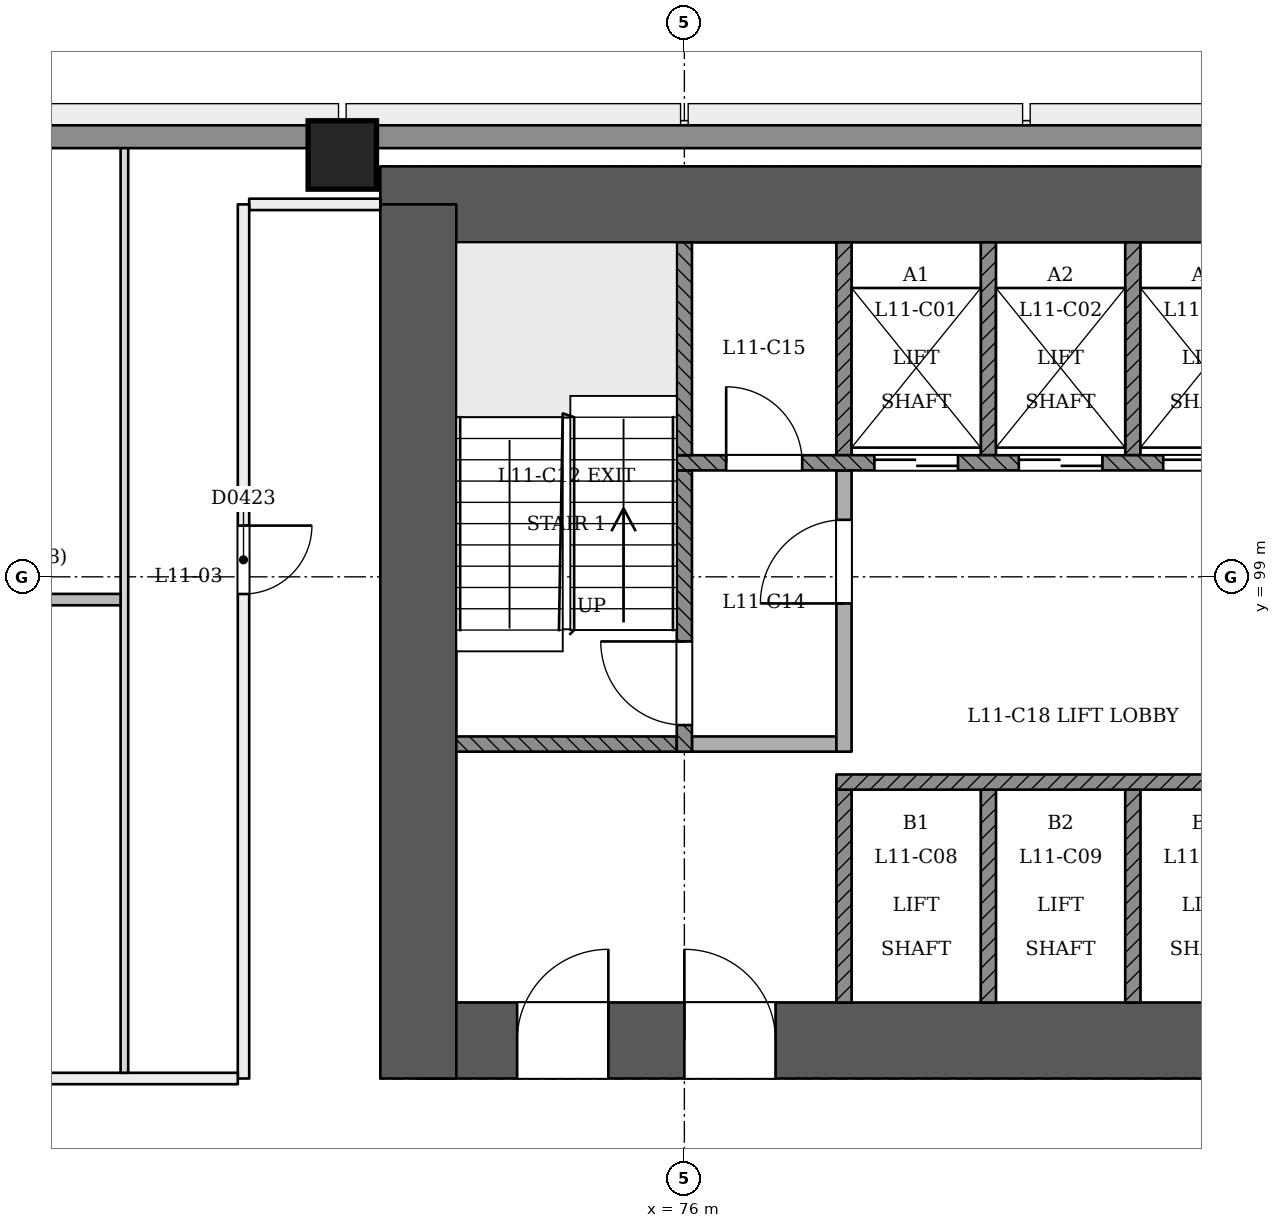
"""IFC4 building model, lengths in metres.
Left out: names, types, materials, properties, quantities, classifications, styles, units other than length and angle.
Written with IfcOpenShell. Run it as: python <this file> out.ifc"""

import sys

from ifc_helpers import new_model, si_unit, direction, frame, frame_2d, origin, origin_2d, place, context, subcontext, project, spatial, rectangle, extrude, element, fill, save


model = new_model("IFC4")
c1 = context("Model", 3, precision=1e-05, world=origin(), true_north=direction((0.0, 1.0)))
c2 = subcontext(c1, "Body", "Model", "MODEL_VIEW")
j1 = project(units=[si_unit("LENGTHUNIT", "METRE"), si_unit("PLANEANGLEUNIT", "RADIAN")], contexts=[c1])
p1 = place(None, origin())
s1 = spatial("IfcSite", under=j1, at=p1, CompositionType="ELEMENT")
p2 = place(p1, origin())
s2 = spatial("IfcBuilding", under=s1, at=p2, CompositionType="ELEMENT")
p3 = place(p2, frame((0.0, 0.0, 48.6)))
s3 = spatial("IfcBuildingStorey", under=s2, at=p3, CompositionType="ELEMENT", Elevation=48.6)
p4 = place(p3, frame((72.5, 92.9, 0.0), z_axis=(0.0, 0.0, 1.0), x_axis=(1.0, 0.0, 0.0)))
e1 = element("IfcWall", 1, at=p4, inside=s3, PredefinedType="SHEAR", context=c2, shape_type="SweptSolid", body=[
    extrude(rectangle(XDim=25.5, YDim=1.0, at=frame_2d((12.75, 0.0))), origin(), (0.0, 0.0, 1.0), 3.6),
])
p5 = place(p4, frame((1.3, 0.0, 0.0)))
e2 = element("IfcOpeningElement", 2, at=p5, cuts=e1, PredefinedType="OPENING", context=c2, shape_type="SweptSolid", body=[
    extrude(rectangle(XDim=1.2, YDim=2.1, at=frame_2d((0.6, 1.05))), frame((0.0, 0.51, 0.0), z_axis=(0.0, -1.0, 0.0), x_axis=(1.0, 0.0, 0.0)), (0.0, 0.0, 1.0), 1.021),
])
p6 = place(p4, frame((3.5, 0.0, 0.0)))
e3 = element("IfcOpeningElement", 3, at=p6, cuts=e1, PredefinedType="OPENING", context=c2, shape_type="SweptSolid", body=[
    extrude(rectangle(XDim=1.2, YDim=2.1, at=frame_2d((0.6, 1.05))), frame((0.0, 0.51, 0.0), z_axis=(0.0, -1.0, 0.0), x_axis=(1.0, 0.0, 0.0)), (0.0, 0.0, 1.0), 1.021),
])
p7 = place(p4, frame((13.5, 0.0, 0.0)))
e4 = element("IfcOpeningElement", 4, at=p7, cuts=e1, PredefinedType="OPENING", context=c2, shape_type="SweptSolid", body=[
    extrude(rectangle(XDim=1.2, YDim=2.1, at=frame_2d((0.6, 1.05))), frame((0.0, 0.51, 0.0), z_axis=(0.0, -1.0, 0.0), x_axis=(1.0, 0.0, 0.0)), (0.0, 0.0, 1.0), 1.021),
])
p8 = place(p4, frame((16.913, 0.0, 0.0)))
e5 = element("IfcOpeningElement", 5, at=p8, cuts=e1, PredefinedType="OPENING", context=c2, shape_type="SweptSolid", body=[
    extrude(rectangle(XDim=1.0, YDim=2.1, at=frame_2d((0.5, 1.05))), frame((0.0, 0.51, 0.0), z_axis=(0.0, -1.0, 0.0), x_axis=(1.0, 0.0, 0.0)), (0.0, 0.0, 1.0), 1.021),
])
p9 = place(p4, frame((20.8, 0.0, 0.0)))
e6 = element("IfcOpeningElement", 6, at=p9, cuts=e1, PredefinedType="OPENING", context=c2, shape_type="SweptSolid", body=[
    extrude(rectangle(XDim=1.0, YDim=2.1, at=frame_2d((0.5, 1.05))), frame((0.0, 0.51, 0.0), z_axis=(0.0, -1.0, 0.0), x_axis=(1.0, 0.0, 0.0)), (0.0, 0.0, 1.0), 1.021),
])
p10 = place(p4, frame((23.238, 0.0, 0.0)))
e7 = element("IfcOpeningElement", 7, at=p10, cuts=e1, PredefinedType="OPENING", context=c2, shape_type="SweptSolid", body=[
    extrude(rectangle(XDim=1.0, YDim=2.1, at=frame_2d((0.5, 1.05))), frame((0.0, 0.51, 0.0), z_axis=(0.0, -1.0, 0.0), x_axis=(1.0, 0.0, 0.0)), (0.0, 0.0, 1.0), 1.021),
])
p11 = place(p3, frame((97.5, 103.9, 0.0), z_axis=(0.0, 0.0, 1.0), x_axis=(-1.0, 0.0, 0.0)))
e8 = element("IfcWall", 8, at=p11, inside=s3, PredefinedType="SHEAR", context=c2, shape_type="SweptSolid", body=[
    extrude(rectangle(XDim=25.5, YDim=1.0, at=frame_2d((12.75, 0.0))), origin(), (0.0, 0.0, 1.0), 3.6),
])
p12 = place(p3, frame((72.5, 103.9, 0.0), z_axis=(0.0, 0.0, 1.0), x_axis=(0.0, -1.0, 0.0)))
e9 = element("IfcWall", 9, at=p12, inside=s3, PredefinedType="SHEAR", context=c2, shape_type="SweptSolid", body=[
    extrude(rectangle(XDim=11.5, YDim=1.0, at=frame_2d((5.75, 0.0))), origin(), (0.0, 0.0, 1.0), 3.6),
])
p13 = place(p3, frame((71.5, 104.55, 0.0), z_axis=(0.0, 0.0, 1.0), x_axis=(1.0, 0.0, 0.0)))
e10 = element("IfcColumn", 10, at=p13, inside=s3, PredefinedType="COLUMN", context=c2, shape_type="SweptSolid", body=[
    extrude(rectangle(XDim=0.9, YDim=0.9, at=origin_2d()), origin(), (0.0, 0.0, 1.0), 3.6),
])
p14 = place(p3, frame((72.0, 103.9, 0.0), z_axis=(0.0, 0.0, 1.0), x_axis=(-1.0, 0.0, 0.0)))
e11 = element("IfcWall", 11, at=p14, inside=s3, PredefinedType="PARTITIONING", context=c2, shape_type="SweptSolid", body=[
    extrude(rectangle(XDim=1.725, YDim=0.15, at=frame_2d((0.863, 0.0))), origin(), (0.0, 0.0, 1.0), 2.6),
])
p15 = place(p3, frame((70.2, 103.9, 0.0), z_axis=(0.0, 0.0, 1.0), x_axis=(0.0, -1.0, 0.0)))
e12 = element("IfcWall", 12, at=p15, inside=s3, PredefinedType="PARTITIONING", context=c2, shape_type="SweptSolid", body=[
    extrude(rectangle(XDim=11.5, YDim=0.15, at=frame_2d((5.75, 0.0))), origin(), (0.0, 0.0, 1.0), 2.6),
])
p16 = place(p15, frame((4.226, 0.0, 0.0)))
e13 = element("IfcOpeningElement", 13, at=p16, cuts=e12, PredefinedType="OPENING", context=c2, shape_type="SweptSolid", body=[
    extrude(rectangle(XDim=0.9, YDim=2.1, at=frame_2d((0.45, 1.05))), frame((0.0, 0.085, 0.0), z_axis=(0.0, -1.0, 0.0), x_axis=(1.0, 0.0, 0.0)), (0.0, 0.0, 1.0), 0.171),
])
p17 = place(p3, frame((70.125, 92.4, 0.0), z_axis=(0.0, 0.0, 1.0), x_axis=(-1.0, 0.0, 0.0)))
e14 = element("IfcWall", 14, at=p17, inside=s3, PredefinedType="PARTITIONING", context=c2, shape_type="SweptSolid", body=[
    extrude(rectangle(XDim=3.679, YDim=0.15, at=frame_2d((1.84, 0.0))), origin(), (0.0, 0.0, 1.0), 3.1),
])
p18 = place(p3, frame((63.923, 93.17, 0.0), z_axis=(0.0, 0.0, 1.0), x_axis=(0.500002225217, -0.866024119051, 0.0)))
e15 = element("IfcWall", 15, at=p18, inside=s3, PredefinedType="PARTITIONING", context=c2, shape_type="SweptSolid", body=[
    extrude(rectangle(XDim=38.6, YDim=0.15, at=frame_2d((19.3, 0.0))), origin(), (0.0, 0.0, 1.0), 2.7),
])
p19 = place(p18, frame((0.605, 0.0, 0.0)))
e16 = element("IfcOpeningElement", 16, at=p19, cuts=e15, PredefinedType="OPENING", context=c2, shape_type="SweptSolid", body=[
    extrude(rectangle(XDim=1.0, YDim=2.1, at=frame_2d((0.5, 1.05))), frame((0.0, 0.085, 0.0), z_axis=(0.0, -1.0, 0.0), x_axis=(1.0, 0.0, 0.0)), (0.0, 0.0, 1.0), 0.171),
])
p20 = place(p18, frame((7.28, 0.0, 0.0)))
e17 = element("IfcOpeningElement", 17, at=p20, cuts=e15, PredefinedType="OPENING", context=c2, shape_type="SweptSolid", body=[
    extrude(rectangle(XDim=1.0, YDim=2.1, at=frame_2d((0.5, 1.05))), frame((0.0, 0.085, 0.0), z_axis=(0.0, -1.0, 0.0), x_axis=(1.0, 0.0, 0.0)), (0.0, 0.0, 1.0), 0.171),
])
p21 = place(p18, frame((9.72, 0.0, 0.0)))
e18 = element("IfcOpeningElement", 18, at=p21, cuts=e15, PredefinedType="OPENING", context=c2, shape_type="SweptSolid", body=[
    extrude(rectangle(XDim=1.0, YDim=2.1, at=frame_2d((0.5, 1.05))), frame((0.0, 0.085, 0.0), z_axis=(0.0, -1.0, 0.0), x_axis=(1.0, 0.0, 0.0)), (0.0, 0.0, 1.0), 0.171),
])
p22 = place(p18, frame((16.395, 0.0, 0.0)))
e19 = element("IfcOpeningElement", 19, at=p22, cuts=e15, PredefinedType="OPENING", context=c2, shape_type="SweptSolid", body=[
    extrude(rectangle(XDim=1.0, YDim=2.1, at=frame_2d((0.5, 1.05))), frame((0.0, 0.085, 0.0), z_axis=(0.0, -1.0, 0.0), x_axis=(1.0, 0.0, 0.0)), (0.0, 0.0, 1.0), 0.171),
])
p23 = place(p18, frame((18.72, 0.0, 0.0)))
e20 = element("IfcOpeningElement", 20, at=p23, cuts=e15, PredefinedType="OPENING", context=c2, shape_type="SweptSolid", body=[
    extrude(rectangle(XDim=1.0, YDim=2.1, at=frame_2d((0.5, 1.05))), frame((0.0, 0.085, 0.0), z_axis=(0.0, -1.0, 0.0), x_axis=(1.0, 0.0, 0.0)), (0.0, 0.0, 1.0), 0.171),
])
p24 = place(p18, frame((25.395, 0.0, 0.0)))
e21 = element("IfcOpeningElement", 21, at=p24, cuts=e15, PredefinedType="OPENING", context=c2, shape_type="SweptSolid", body=[
    extrude(rectangle(XDim=1.0, YDim=2.1, at=frame_2d((0.5, 1.05))), frame((0.0, 0.085, 0.0), z_axis=(0.0, -1.0, 0.0), x_axis=(1.0, 0.0, 0.0)), (0.0, 0.0, 1.0), 0.171),
])
p25 = place(p18, frame((27.605, 0.0, 0.0)))
e22 = element("IfcOpeningElement", 22, at=p25, cuts=e15, PredefinedType="OPENING", context=c2, shape_type="SweptSolid", body=[
    extrude(rectangle(XDim=1.0, YDim=2.1, at=frame_2d((0.5, 1.05))), frame((0.0, 0.085, 0.0), z_axis=(0.0, -1.0, 0.0), x_axis=(1.0, 0.0, 0.0)), (0.0, 0.0, 1.0), 0.171),
])
p26 = place(p18, frame((34.28, 0.0, 0.0)))
e23 = element("IfcOpeningElement", 23, at=p26, cuts=e15, PredefinedType="OPENING", context=c2, shape_type="SweptSolid", body=[
    extrude(rectangle(XDim=1.0, YDim=2.1, at=frame_2d((0.5, 1.05))), frame((0.0, 0.085, 0.0), z_axis=(0.0, -1.0, 0.0), x_axis=(1.0, 0.0, 0.0)), (0.0, 0.0, 1.0), 0.171),
])
p27 = place(p18, frame((37.342, 0.0, 0.0)))
e24 = element("IfcOpeningElement", 24, at=p27, cuts=e15, PredefinedType="OPENING", context=c2, shape_type="SweptSolid", body=[
    extrude(rectangle(XDim=1.0, YDim=2.1, at=frame_2d((0.5, 1.05))), frame((0.0, 0.085, 0.0), z_axis=(0.0, -1.0, 0.0), x_axis=(1.0, 0.0, 0.0)), (0.0, 0.0, 1.0), 0.171),
])
p28 = place(p3, frame((68.633, 104.9, 0.0), z_axis=(0.0, 0.0, 1.0), x_axis=(0.0, -1.0, 0.0)))
e25 = element("IfcWall", 25, at=p28, inside=s3, PredefinedType="PARTITIONING", context=c2, shape_type="SweptSolid", body=[
    extrude(rectangle(XDim=12.425, YDim=0.1, at=frame_2d((6.212, 0.0))), origin(), (0.0, 0.0, 1.0), 2.6),
])
p29 = place(p3, frame((68.583, 98.7, 0.0), z_axis=(0.0, 0.0, 1.0), x_axis=(-1.0, 0.0, 0.0)))
e26 = element("IfcWall", 26, at=p29, inside=s3, PredefinedType="PARTITIONING", context=c2, shape_type="SweptSolid", body=[
    extrude(rectangle(XDim=3.741, YDim=0.15, at=frame_2d((1.871, 0.0))), origin(), (0.0, 0.0, 1.0), 3.1),
])
p30 = place(p3, frame((59.125, 104.79, 0.0), z_axis=(0.0, 0.0, 1.0), x_axis=(1.0, 0.0, 0.0)))
e27 = element("IfcWall", 27, at=p30, inside=s3, PredefinedType="SOLIDWALL", context=c2, shape_type="SweptSolid", body=[
    extrude(rectangle(XDim=51.75, YDim=0.3, at=frame_2d((25.875, 0.0))), origin(), (0.0, 0.0, 1.0), 2.6),
])
for number, where, z_axis, x_axis in (
    (28, (78.1, 93.4, 0.0), (0.0, 0.0, 1.0), (0.0, 1.0, 0.0)),
    (29, (80.0, 93.4, 0.0), (0.0, 0.0, 1.0), (0.0, 1.0, 0.0)),
    (30, (81.9, 93.4, 0.0), (0.0, 0.0, 1.0), (0.0, 1.0, 0.0)),
):
    element("IfcWall", number, at=place(p3, frame(where, z_axis=z_axis, x_axis=x_axis)), inside=s3, PredefinedType="SOLIDWALL", context=c2, shape_type="SweptSolid", body=[
        extrude(rectangle(XDim=2.8, YDim=0.2, at=frame_2d((1.4, 0.0))), origin(), (0.0, 0.0, 1.0), 3.1),
    ])
p31 = place(p3, frame((78.0, 96.3, 0.0), z_axis=(0.0, 0.0, 1.0), x_axis=(1.0, 0.0, 0.0)))
e31 = element("IfcWall", 31, at=p31, inside=s3, PredefinedType="SOLIDWALL", context=c2, shape_type="SweptSolid", body=[
    extrude(rectangle(XDim=7.8, YDim=0.2, at=frame_2d((3.9, 0.0))), origin(), (0.0, 0.0, 1.0), 3.1),
])
p32 = place(p3, frame((73.0, 96.8, 0.0), z_axis=(0.0, 0.0, 1.0), x_axis=(1.0, 0.0, 0.0)))
e32 = element("IfcWall", 32, at=p32, inside=s3, PredefinedType="SOLIDWALL", context=c2, shape_type="SweptSolid", body=[
    extrude(rectangle(XDim=2.9, YDim=0.2, at=frame_2d((1.45, 0.0))), origin(), (0.0, 0.0, 1.0), 3.1),
])
p33 = place(p3, frame((76.0, 96.7, 0.0), z_axis=(0.0, 0.0, 1.0), x_axis=(0.0, 1.0, 0.0)))
e33 = element("IfcWall", 33, at=p33, inside=s3, PredefinedType="SOLIDWALL", context=c2, shape_type="SweptSolid", body=[
    extrude(rectangle(XDim=3.7, YDim=0.2, at=frame_2d((1.85, 0.0))), origin(), (0.0, 0.0, 1.0), 3.1),
])
p34 = place(p33, frame((0.35, 0.0, 0.0)))
e34 = element("IfcOpeningElement", 34, at=p34, cuts=e33, PredefinedType="OPENING", context=c2, shape_type="SweptSolid", body=[
    extrude(rectangle(XDim=1.1, YDim=2.1, at=frame_2d((0.55, 1.05))), frame((0.0, 0.11, 0.0), z_axis=(0.0, -1.0, 0.0), x_axis=(1.0, 0.0, 0.0)), (0.0, 0.0, 1.0), 0.221),
])
p35 = place(p3, frame((76.1, 96.8, 0.0), z_axis=(0.0, 0.0, 1.0), x_axis=(1.0, 0.0, 0.0)))
e35 = element("IfcWall", 35, at=p35, inside=s3, PredefinedType="PARTITIONING", context=c2, shape_type="SweptSolid", body=[
    extrude(rectangle(XDim=1.9, YDim=0.2, at=frame_2d((0.95, 0.0))), origin(), (0.0, 0.0, 1.0), 3.1),
])
p36 = place(p3, frame((78.1, 96.7, 0.0), z_axis=(0.0, 0.0, 1.0), x_axis=(0.0, 1.0, 0.0)))
e36 = element("IfcWall", 36, at=p36, inside=s3, PredefinedType="PARTITIONING", context=c2, shape_type="SweptSolid", body=[
    extrude(rectangle(XDim=3.7, YDim=0.2, at=frame_2d((1.85, 0.0))), origin(), (0.0, 0.0, 1.0), 3.1),
])
p37 = place(p36, frame((1.95, 0.0, 0.0)))
e37 = element("IfcOpeningElement", 37, at=p37, cuts=e36, PredefinedType="OPENING", context=c2, shape_type="SweptSolid", body=[
    extrude(rectangle(XDim=1.1, YDim=2.1, at=frame_2d((0.55, 1.05))), frame((0.0, 0.11, 0.0), z_axis=(0.0, -1.0, 0.0), x_axis=(1.0, 0.0, 0.0)), (0.0, 0.0, 1.0), 0.221),
])
p38 = place(p3, frame((75.9, 100.5, 0.0), z_axis=(0.0, 0.0, 1.0), x_axis=(1.0, 0.0, 0.0)))
e38 = element("IfcWall", 38, at=p38, inside=s3, PredefinedType="SOLIDWALL", context=c2, shape_type="SweptSolid", body=[
    extrude(rectangle(XDim=18.2, YDim=0.2, at=frame_2d((9.1, 0.0))), origin(), (0.0, 0.0, 1.0), 3.1),
])
p39 = place(p38, frame((2.6, 0.0, 0.0)))
e39 = element("IfcOpeningElement", 39, at=p39, cuts=e38, PredefinedType="OPENING", context=c2, shape_type="SweptSolid", body=[
    extrude(rectangle(XDim=1.1, YDim=2.1, at=frame_2d((0.55, 1.05))), frame((0.0, 0.11, 0.0), z_axis=(0.0, -1.0, 0.0), x_axis=(1.0, 0.0, 0.0)), (0.0, 0.0, 1.0), 0.221),
])
p40 = place(p38, frame((4.5, 0.0, 0.0)))
e40 = element("IfcOpeningElement", 40, at=p40, cuts=e38, PredefinedType="OPENING", context=c2, shape_type="SweptSolid", body=[
    extrude(rectangle(XDim=1.1, YDim=2.1, at=frame_2d((0.55, 1.05))), frame((0.0, 0.11, 0.0), z_axis=(0.0, -1.0, 0.0), x_axis=(1.0, 0.0, 0.0)), (0.0, 0.0, 1.0), 0.221),
])
p41 = place(p38, frame((6.4, 0.0, 0.0)))
e41 = element("IfcOpeningElement", 41, at=p41, cuts=e38, PredefinedType="OPENING", context=c2, shape_type="SweptSolid", body=[
    extrude(rectangle(XDim=1.1, YDim=2.1, at=frame_2d((0.55, 1.05))), frame((0.0, 0.11, 0.0), z_axis=(0.0, -1.0, 0.0), x_axis=(1.0, 0.0, 0.0)), (0.0, 0.0, 1.0), 0.221),
])
p42 = place(p38, frame((8.3, 0.0, 0.0)))
e42 = element("IfcOpeningElement", 42, at=p42, cuts=e38, PredefinedType="OPENING", context=c2, shape_type="SweptSolid", body=[
    extrude(rectangle(XDim=1.1, YDim=2.1, at=frame_2d((0.55, 1.05))), frame((0.0, 0.11, 0.0), z_axis=(0.0, -1.0, 0.0), x_axis=(1.0, 0.0, 0.0)), (0.0, 0.0, 1.0), 0.221),
])
p43 = place(p38, frame((10.2, 0.0, 0.0)))
e43 = element("IfcOpeningElement", 43, at=p43, cuts=e38, PredefinedType="OPENING", context=c2, shape_type="SweptSolid", body=[
    extrude(rectangle(XDim=1.1, YDim=2.1, at=frame_2d((0.55, 1.05))), frame((0.0, 0.11, 0.0), z_axis=(0.0, -1.0, 0.0), x_axis=(1.0, 0.0, 0.0)), (0.0, 0.0, 1.0), 0.221),
])
p44 = place(p38, frame((12.1, 0.0, 0.0)))
e44 = element("IfcOpeningElement", 44, at=p44, cuts=e38, PredefinedType="OPENING", context=c2, shape_type="SweptSolid", body=[
    extrude(rectangle(XDim=1.1, YDim=2.1, at=frame_2d((0.55, 1.05))), frame((0.0, 0.11, 0.0), z_axis=(0.0, -1.0, 0.0), x_axis=(1.0, 0.0, 0.0)), (0.0, 0.0, 1.0), 0.221),
])
p45 = place(p38, frame((14.0, 0.0, 0.0)))
e45 = element("IfcOpeningElement", 45, at=p45, cuts=e38, PredefinedType="OPENING", context=c2, shape_type="SweptSolid", body=[
    extrude(rectangle(XDim=1.1, YDim=2.1, at=frame_2d((0.55, 1.05))), frame((0.0, 0.11, 0.0), z_axis=(0.0, -1.0, 0.0), x_axis=(1.0, 0.0, 0.0)), (0.0, 0.0, 1.0), 0.221),
])
p46 = place(p38, frame((0.65, 0.0, 0.0)))
e46 = element("IfcOpeningElement", 46, at=p46, cuts=e38, PredefinedType="OPENING", context=c2, shape_type="SweptSolid", body=[
    extrude(rectangle(XDim=1.0, YDim=2.1, at=frame_2d((0.5, 1.05))), frame((0.0, 0.11, 0.0), z_axis=(0.0, -1.0, 0.0), x_axis=(1.0, 0.0, 0.0)), (0.0, 0.0, 1.0), 0.221),
])
p47 = place(p38, frame((16.3, 0.0, 0.0)))
e47 = element("IfcOpeningElement", 47, at=p47, cuts=e38, PredefinedType="OPENING", context=c2, shape_type="SweptSolid", body=[
    extrude(rectangle(XDim=1.0, YDim=2.1, at=frame_2d((0.5, 1.05))), frame((0.0, 0.11, 0.0), z_axis=(0.0, -1.0, 0.0), x_axis=(1.0, 0.0, 0.0)), (0.0, 0.0, 1.0), 0.221),
])
for number, where, z_axis, x_axis in (
    (48, (76.0, 100.6, 0.0), (0.0, 0.0, 1.0), (0.0, 1.0, 0.0)),
    (49, (78.1, 100.6, 0.0), (0.0, 0.0, 1.0), (0.0, 1.0, 0.0)),
    (50, (80.0, 100.6, 0.0), (0.0, 0.0, 1.0), (0.0, 1.0, 0.0)),
    (51, (81.9, 100.6, 0.0), (0.0, 0.0, 1.0), (0.0, 1.0, 0.0)),
):
    element("IfcWall", number, at=place(p3, frame(where, z_axis=z_axis, x_axis=x_axis)), inside=s3, PredefinedType="SOLIDWALL", context=c2, shape_type="SweptSolid", body=[
        extrude(rectangle(XDim=2.8, YDim=0.2, at=frame_2d((1.4, 0.0))), origin(), (0.0, 0.0, 1.0), 3.1),
    ])
p48 = place(p16, origin())
e52 = element("IfcDoor", 52, at=p48, inside=s3, OperationType="SINGLE_SWING_LEFT", PredefinedType="NOTDEFINED", context=c2, shape_type="SweptSolid", body=[
    extrude(rectangle(XDim=0.9, YDim=2.1, at=frame_2d((0.45, 1.05))), frame((0.0, 0.025, 0.0), z_axis=(0.0, -1.0, 0.0), x_axis=(1.0, 0.0, 0.0)), (0.0, 0.0, 1.0), 0.05),
])
fill(e13, e52)
p49 = place(p39, origin())
e53 = element("IfcDoor", 53, at=p49, inside=s3, OperationType="SLIDING_TO_RIGHT", PredefinedType="NOTDEFINED", context=c2, shape_type="SweptSolid", body=[
    extrude(rectangle(XDim=1.1, YDim=2.1, at=frame_2d((0.55, 1.05))), frame((0.0, 0.025, 0.0), z_axis=(0.0, -1.0, 0.0), x_axis=(1.0, 0.0, 0.0)), (0.0, 0.0, 1.0), 0.05),
])
fill(e39, e53)
p50 = place(p40, origin())
e54 = element("IfcDoor", 54, at=p50, inside=s3, OperationType="SLIDING_TO_LEFT", PredefinedType="NOTDEFINED", context=c2, shape_type="SweptSolid", body=[
    extrude(rectangle(XDim=1.1, YDim=2.1, at=frame_2d((0.55, 1.05))), frame((0.0, 0.025, 0.0), z_axis=(0.0, -1.0, 0.0), x_axis=(1.0, 0.0, 0.0)), (0.0, 0.0, 1.0), 0.05),
])
fill(e40, e54)
p51 = place(p41, origin())
e55 = element("IfcDoor", 55, at=p51, inside=s3, OperationType="SLIDING_TO_RIGHT", PredefinedType="NOTDEFINED", context=c2, shape_type="SweptSolid", body=[
    extrude(rectangle(XDim=1.1, YDim=2.1, at=frame_2d((0.55, 1.05))), frame((0.0, 0.025, 0.0), z_axis=(0.0, -1.0, 0.0), x_axis=(1.0, 0.0, 0.0)), (0.0, 0.0, 1.0), 0.05),
])
fill(e41, e55)
p52 = place(p34, origin())
e56 = element("IfcDoor", 56, at=p52, inside=s3, OperationType="SINGLE_SWING_RIGHT", PredefinedType="NOTDEFINED", context=c2, shape_type="SweptSolid", body=[
    extrude(rectangle(XDim=1.1, YDim=2.1, at=frame_2d((0.55, 1.05))), frame((0.0, 0.025, 0.0), z_axis=(0.0, -1.0, 0.0), x_axis=(1.0, 0.0, 0.0)), (0.0, 0.0, 1.0), 0.05),
])
fill(e34, e56)
p53 = place(p37, origin())
e57 = element("IfcDoor", 57, at=p53, inside=s3, OperationType="SINGLE_SWING_LEFT", PredefinedType="NOTDEFINED", context=c2, shape_type="SweptSolid", body=[
    extrude(rectangle(XDim=1.1, YDim=2.1, at=frame_2d((0.55, 1.05))), frame((0.0, 0.025, 0.0), z_axis=(0.0, -1.0, 0.0), x_axis=(1.0, 0.0, 0.0)), (0.0, 0.0, 1.0), 0.05),
])
fill(e37, e57)
p54 = place(p5, origin())
e58 = element("IfcDoor", 58, at=p54, inside=s3, OperationType="SINGLE_SWING_RIGHT", PredefinedType="NOTDEFINED", context=c2, shape_type="SweptSolid", body=[
    extrude(rectangle(XDim=1.2, YDim=2.1, at=frame_2d((0.6, 1.05))), frame((0.0, 0.025, 0.0), z_axis=(0.0, -1.0, 0.0), x_axis=(1.0, 0.0, 0.0)), (0.0, 0.0, 1.0), 0.05),
])
fill(e2, e58)
p55 = place(p6, origin())
e59 = element("IfcDoor", 59, at=p55, inside=s3, OperationType="SINGLE_SWING_LEFT", PredefinedType="NOTDEFINED", context=c2, shape_type="SweptSolid", body=[
    extrude(rectangle(XDim=1.2, YDim=2.1, at=frame_2d((0.6, 1.05))), frame((0.0, 0.025, 0.0), z_axis=(0.0, -1.0, 0.0), x_axis=(1.0, 0.0, 0.0)), (0.0, 0.0, 1.0), 0.05),
])
fill(e3, e59)
p56 = place(p46, origin())
e60 = element("IfcDoor", 60, at=p56, inside=s3, OperationType="SINGLE_SWING_LEFT", PredefinedType="NOTDEFINED", context=c2, shape_type="SweptSolid", body=[
    extrude(rectangle(XDim=1.0, YDim=2.1, at=frame_2d((0.5, 1.05))), frame((0.0, 0.025, 0.0), z_axis=(0.0, -1.0, 0.0), x_axis=(1.0, 0.0, 0.0)), (0.0, 0.0, 1.0), 0.05),
])
fill(e46, e60)
save(model, sys.argv[1])
